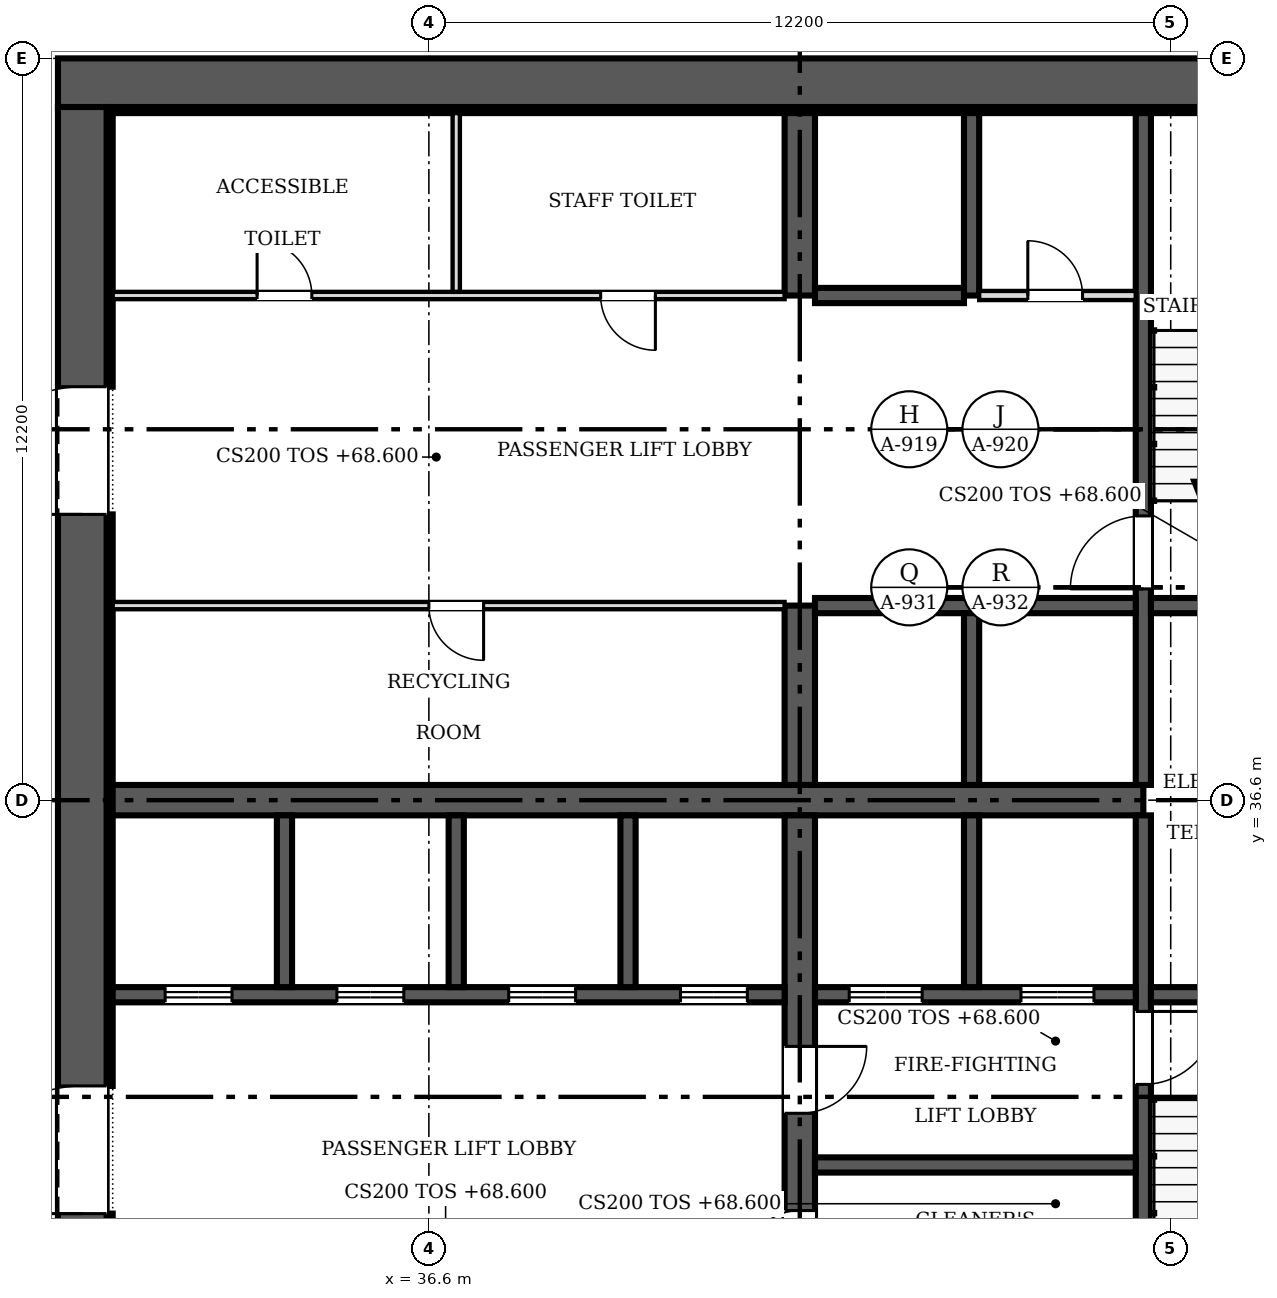
"""IFC4 building model, lengths in metres.
Left out: names, types, materials, properties, quantities, classifications, styles, units other than length and angle.
Written with IfcOpenShell. Run it as: python <this file> out.ifc"""

import sys

from ifc_helpers import new_model, si_unit, direction, frame, frame_2d, origin, place, context, subcontext, project, spatial, rectangle, extrude, source, transform, mapped, element, fill, save


model = new_model("IFC4")
c1 = context("Model", 3, precision=1e-05, world=origin(), true_north=direction((0.0, 1.0)))
c2 = subcontext(c1, "Body", "Model", "MODEL_VIEW")
j1 = project(units=[si_unit("LENGTHUNIT", "METRE"), si_unit("PLANEANGLEUNIT", "RADIAN")], contexts=[c1])
p1 = place(None, origin())
s1 = spatial("IfcSite", under=j1, at=p1, CompositionType="ELEMENT")
p2 = place(p1, origin())
s2 = spatial("IfcBuilding", under=s1, at=p2, CompositionType="ELEMENT")
p3 = place(p2, frame((0.0, 0.0, 68.6)))
s3 = spatial("IfcBuildingStorey", under=s2, at=p3, CompositionType="ELEMENT", Elevation=68.6)
p4 = place(p3, frame((30.9, 25.2, 0.0), z_axis=(0.0, 0.0, 1.0), x_axis=(0.0, 1.0, 0.0)))
e1 = element("IfcWall", 1, at=p4, inside=s3, PredefinedType="SHEAR", context=c2, shape_type="SweptSolid", body=[
    extrude(rectangle(XDim=22.8, YDim=0.8, at=frame_2d((11.4, 0.0))), origin(), (0.0, 0.0, 1.0), 3.8),
])
m1 = source(origin(), c2, "Body", "SweptSolid", [
    extrude(rectangle(XDim=2.1, YDim=2.4, at=frame_2d((1.05, 1.2))), frame((0.0, 0.41, 0.0), z_axis=(0.0, -1.0, 0.0), x_axis=(1.0, 0.0, 0.0)), (0.0, 0.0, 1.0), 0.82),
])
p5 = place(p4, frame((4.6, 0.0, 0.0)))
e2 = element("IfcOpeningElement", 2, at=p5, cuts=e1, PredefinedType="OPENING", context=c2, shape_type="MappedRepresentation", body=[
    mapped(m1, transform((0.0, 0.0, 0.0), scale=1.0)),
])
p6 = place(p4, frame((16.1, 0.0, 0.0)))
e3 = element("IfcOpeningElement", 3, at=p6, cuts=e1, PredefinedType="OPENING", context=c2, shape_type="MappedRepresentation", body=[
    mapped(m1, transform((0.0, 0.0, 0.0), scale=1.0)),
])
p7 = place(p3, frame((30.5, 48.4, 0.0), z_axis=(0.0, 0.0, 1.0), x_axis=(1.0, 0.0, 0.0)))
e4 = element("IfcWall", 4, at=p7, inside=s3, PredefinedType="SHEAR", context=c2, shape_type="SweptSolid", body=[
    extrude(rectangle(XDim=24.4, YDim=0.8, at=frame_2d((12.2, 0.0))), origin(), (0.0, 0.0, 1.0), 3.8),
])
p8 = place(p3, frame((31.3, 47.95, 0.0), z_axis=(0.0, 0.0, 1.0), x_axis=(1.0, 0.0, 0.0)))
e5 = element("IfcWall", 5, at=p8, inside=s3, PredefinedType="SOLIDWALL", context=c2, shape_type="SweptSolid", body=[
    extrude(rectangle(XDim=22.8, YDim=0.1, at=frame_2d((11.4, 0.0))), origin(), (0.0, 0.0, 1.0), 3.8),
])
p9 = place(p3, frame((31.35, 25.3, 0.0), z_axis=(0.0, 0.0, 1.0), x_axis=(0.0, 1.0, 0.0)))
e6 = element("IfcWall", 6, at=p9, inside=s3, PredefinedType="SOLIDWALL", context=c2, shape_type="SweptSolid", body=[
    extrude(rectangle(XDim=4.5, YDim=0.1, at=frame_2d((2.25, 0.0))), origin(), (0.0, 0.0, 1.0), 3.8),
])
p10 = place(p3, frame((31.35, 31.9, 0.0), z_axis=(0.0, 0.0, 1.0), x_axis=(0.0, 1.0, 0.0)))
e7 = element("IfcWall", 7, at=p10, inside=s3, PredefinedType="SOLIDWALL", context=c2, shape_type="SweptSolid", body=[
    extrude(rectangle(XDim=9.4, YDim=0.1, at=frame_2d((4.7, 0.0))), origin(), (0.0, 0.0, 1.0), 3.8),
])
p11 = place(p3, frame((31.35, 43.4, 0.0), z_axis=(0.0, 0.0, 1.0), x_axis=(0.0, 1.0, 0.0)))
e8 = element("IfcWall", 8, at=p11, inside=s3, PredefinedType="SOLIDWALL", context=c2, shape_type="SweptSolid", body=[
    extrude(rectangle(XDim=4.5, YDim=0.1, at=frame_2d((2.25, 0.0))), origin(), (0.0, 0.0, 1.0), 3.8),
])
p12 = place(p3, frame((31.4, 36.6, 0.0), z_axis=(0.0, 0.0, 1.0), x_axis=(1.0, 0.0, 0.0)))
e9 = element("IfcWall", 9, at=p12, inside=s3, PredefinedType="SHEAR", context=c2, shape_type="SweptSolid", body=[
    extrude(rectangle(XDim=16.95, YDim=0.5, at=frame_2d((8.475, 0.0))), origin(), (0.0, 0.0, 1.0), 3.8),
])
p13 = place(p3, frame((42.7, 36.35, 0.0), z_axis=(0.0, 0.0, 1.0), x_axis=(0.0, -1.0, 0.0)))
e10 = element("IfcWall", 10, at=p13, inside=s3, PredefinedType="SHEAR", context=c2, shape_type="SweptSolid", body=[
    extrude(rectangle(XDim=11.05, YDim=0.5, at=frame_2d((5.525, 0.0))), origin(), (0.0, 0.0, 1.0), 3.8),
])
m2 = source(origin(), c2, "Body", "SweptSolid", [
    extrude(rectangle(XDim=0.9, YDim=2.1, at=frame_2d((0.45, 1.05))), frame((0.0, 0.26, 0.0), z_axis=(0.0, -1.0, 0.0), x_axis=(1.0, 0.0, 0.0)), (0.0, 0.0, 1.0), 0.52),
])
p14 = place(p13, frame((6.5, 0.0, 0.0)))
e11 = element("IfcOpeningElement", 11, at=p14, cuts=e10, PredefinedType="OPENING", context=c2, shape_type="MappedRepresentation", body=[
    mapped(m2, transform((0.0, 0.0, 0.0), scale=1.0)),
])
m3 = source(origin(), c2, "Body", "SweptSolid", [
    extrude(rectangle(XDim=1.1, YDim=2.1, at=frame_2d((0.55, 1.05))), frame((0.0, 0.26, 0.0), z_axis=(0.0, -1.0, 0.0), x_axis=(1.0, 0.0, 0.0)), (0.0, 0.0, 1.0), 0.52),
])
p15 = place(p13, frame((3.8, 0.0, 0.0)))
e12 = element("IfcOpeningElement", 12, at=p15, cuts=e10, PredefinedType="OPENING", context=c2, shape_type="MappedRepresentation", body=[
    mapped(m3, transform((0.0, 0.0, 0.0), scale=1.0)),
])
p16 = place(p3, frame((42.7, 36.85, 0.0), z_axis=(0.0, 0.0, 1.0), x_axis=(0.0, 1.0, 0.0)))
e13 = element("IfcWall", 13, at=p16, inside=s3, PredefinedType="SHEAR", context=c2, shape_type="SweptSolid", body=[
    extrude(rectangle(XDim=2.95, YDim=0.5, at=frame_2d((1.475, 0.0))), origin(), (0.0, 0.0, 1.0), 3.8),
])
p17 = place(p3, frame((42.7, 44.9, 0.0), z_axis=(0.0, 0.0, 1.0), x_axis=(0.0, 1.0, 0.0)))
e14 = element("IfcWall", 14, at=p17, inside=s3, PredefinedType="SHEAR", context=c2, shape_type="SweptSolid", body=[
    extrude(rectangle(XDim=3.0, YDim=0.5, at=frame_2d((1.5, 0.0))), origin(), (0.0, 0.0, 1.0), 3.8),
])
p18 = place(p3, frame((48.35, 36.35, 0.0), z_axis=(0.0, 0.0, 1.0), x_axis=(0.0, -1.0, 0.0)))
e15 = element("IfcWall", 15, at=p18, inside=s3, PredefinedType="SOLIDWALL", context=c2, shape_type="SweptSolid", body=[
    extrude(rectangle(XDim=11.05, YDim=0.25, at=frame_2d((5.525, 0.0))), origin(), (0.0, 0.0, 1.0), 3.8),
])
m4 = source(origin(), c2, "Body", "SweptSolid", [
    extrude(rectangle(XDim=1.2, YDim=2.1, at=frame_2d((0.6, 1.05))), frame((0.0, 0.135, 0.0), z_axis=(0.0, -1.0, 0.0), x_axis=(1.0, 0.0, 0.0)), (0.0, 0.0, 1.0), 0.27),
])
p19 = place(p18, frame((3.225, 0.0, 0.0)))
e16 = element("IfcOpeningElement", 16, at=p19, cuts=e15, PredefinedType="OPENING", context=c2, shape_type="MappedRepresentation", body=[
    mapped(m4, transform((0.0, 0.0, 0.0), scale=1.0)),
])
p20 = place(p3, frame((48.35, 47.9, 0.0), z_axis=(0.0, 0.0, 1.0), x_axis=(0.0, -1.0, 0.0)))
e17 = element("IfcWall", 17, at=p20, inside=s3, PredefinedType="SOLIDWALL", context=c2, shape_type="SweptSolid", body=[
    extrude(rectangle(XDim=11.05, YDim=0.25, at=frame_2d((5.525, 0.0))), origin(), (0.0, 0.0, 1.0), 3.8),
])
p21 = place(p20, frame((6.625, 0.0, 0.0)))
e18 = element("IfcOpeningElement", 18, at=p21, cuts=e17, PredefinedType="OPENING", context=c2, shape_type="MappedRepresentation", body=[
    mapped(m4, transform((0.0, 0.0, 0.0), scale=1.0)),
])
p22 = place(p3, frame((42.45, 33.4, 0.0), z_axis=(0.0, 0.0, 1.0), x_axis=(-1.0, 0.0, 0.0)))
e19 = element("IfcWall", 19, at=p22, inside=s3, PredefinedType="SOLIDWALL", context=c2, shape_type="SweptSolid", body=[
    extrude(rectangle(XDim=11.05, YDim=0.25, at=frame_2d((5.525, 0.0))), origin(), (0.0, 0.0, 1.0), 3.8),
])
m5 = source(origin(), c2, "Body", "SweptSolid", [
    extrude(rectangle(XDim=1.1, YDim=2.1, at=frame_2d((0.55, 1.05))), frame((0.0, 0.135, 0.0), z_axis=(0.0, -1.0, 0.0), x_axis=(1.0, 0.0, 0.0)), (0.0, 0.0, 1.0), 0.27),
])
p23 = place(p22, frame((9.087, 0.0, 0.0)))
e20 = element("IfcOpeningElement", 20, at=p23, cuts=e19, PredefinedType="OPENING", context=c2, shape_type="MappedRepresentation", body=[
    mapped(m5, transform((0.0, 0.0, 0.0), scale=1.0)),
])
p24 = place(p22, frame((6.262, 0.0, 0.0)))
e21 = element("IfcOpeningElement", 21, at=p24, cuts=e19, PredefinedType="OPENING", context=c2, shape_type="MappedRepresentation", body=[
    mapped(m5, transform((0.0, 0.0, 0.0), scale=1.0)),
])
p25 = place(p22, frame((3.438, 0.0, 0.0)))
e22 = element("IfcOpeningElement", 22, at=p25, cuts=e19, PredefinedType="OPENING", context=c2, shape_type="MappedRepresentation", body=[
    mapped(m5, transform((0.0, 0.0, 0.0), scale=1.0)),
])
p26 = place(p22, frame((0.613, 0.0, 0.0)))
e23 = element("IfcOpeningElement", 23, at=p26, cuts=e19, PredefinedType="OPENING", context=c2, shape_type="MappedRepresentation", body=[
    mapped(m5, transform((0.0, 0.0, 0.0), scale=1.0)),
])
p27 = place(p3, frame((48.225, 33.4, 0.0), z_axis=(0.0, 0.0, 1.0), x_axis=(-1.0, 0.0, 0.0)))
e24 = element("IfcWall", 24, at=p27, inside=s3, PredefinedType="SOLIDWALL", context=c2, shape_type="SweptSolid", body=[
    extrude(rectangle(XDim=5.275, YDim=0.25, at=frame_2d((2.638, 0.0))), origin(), (0.0, 0.0, 1.0), 3.8),
])
p28 = place(p27, frame((3.512, 0.0, 0.0)))
e25 = element("IfcOpeningElement", 25, at=p28, cuts=e24, PredefinedType="OPENING", context=c2, shape_type="MappedRepresentation", body=[
    mapped(m4, transform((0.0, 0.0, 0.0), scale=1.0)),
])
p29 = place(p27, frame((0.688, 0.0, 0.0)))
e26 = element("IfcOpeningElement", 26, at=p29, cuts=e24, PredefinedType="OPENING", context=c2, shape_type="MappedRepresentation", body=[
    mapped(m4, transform((0.0, 0.0, 0.0), scale=1.0)),
])
p30 = place(p3, frame((48.475, 33.4, 0.0), z_axis=(0.0, 0.0, 1.0), x_axis=(1.0, 0.0, 0.0)))
e27 = element("IfcWall", 27, at=p30, inside=s3, PredefinedType="SOLIDWALL", context=c2, shape_type="SweptSolid", body=[
    extrude(rectangle(XDim=3.525, YDim=0.25, at=frame_2d((1.762, 0.0))), origin(), (0.0, 0.0, 1.0), 3.8),
])
p31 = place(p3, frame((42.95, 39.8, 0.0), z_axis=(0.0, 0.0, 1.0), x_axis=(1.0, 0.0, 0.0)))
e28 = element("IfcWall", 28, at=p31, inside=s3, PredefinedType="SOLIDWALL", context=c2, shape_type="SweptSolid", body=[
    extrude(rectangle(XDim=5.275, YDim=0.25, at=frame_2d((2.638, 0.0))), origin(), (0.0, 0.0, 1.0), 3.8),
])
p32 = place(p3, frame((48.475, 39.8, 0.0), z_axis=(0.0, 0.0, 1.0), x_axis=(1.0, 0.0, 0.0)))
e29 = element("IfcWall", 29, at=p32, inside=s3, PredefinedType="SOLIDWALL", context=c2, shape_type="SweptSolid", body=[
    extrude(rectangle(XDim=3.525, YDim=0.25, at=frame_2d((1.762, 0.0))), origin(), (0.0, 0.0, 1.0), 3.8),
])
p33 = place(p3, frame((45.525, 33.525, 0.0), z_axis=(0.0, 0.0, 1.0), x_axis=(0.0, 1.0, 0.0)))
e30 = element("IfcWall", 30, at=p33, inside=s3, PredefinedType="SOLIDWALL", context=c2, shape_type="SweptSolid", body=[
    extrude(rectangle(XDim=2.825, YDim=0.25, at=frame_2d((1.413, 0.0))), origin(), (0.0, 0.0, 1.0), 3.8),
])
p34 = place(p3, frame((45.525, 36.85, 0.0), z_axis=(0.0, 0.0, 1.0), x_axis=(0.0, 1.0, 0.0)))
e31 = element("IfcWall", 31, at=p34, inside=s3, PredefinedType="SOLIDWALL", context=c2, shape_type="SweptSolid", body=[
    extrude(rectangle(XDim=2.825, YDim=0.25, at=frame_2d((1.413, 0.0))), origin(), (0.0, 0.0, 1.0), 3.8),
])
p35 = place(p3, frame((42.95, 30.6, 0.0), z_axis=(0.0, 0.0, 1.0), x_axis=(1.0, 0.0, 0.0)))
e32 = element("IfcWall", 32, at=p35, inside=s3, PredefinedType="SOLIDWALL", context=c2, shape_type="SweptSolid", body=[
    extrude(rectangle(XDim=5.275, YDim=0.25, at=frame_2d((2.638, 0.0))), origin(), (0.0, 0.0, 1.0), 3.8),
])
for number, where, z_axis, x_axis in (
    (33, (34.225, 33.525, 0.0), (0.0, 0.0, 1.0), (0.0, 1.0, 0.0)),
    (34, (37.05, 33.525, 0.0), (0.0, 0.0, 1.0), (0.0, 1.0, 0.0)),
    (35, (39.875, 33.525, 0.0), (0.0, 0.0, 1.0), (0.0, 1.0, 0.0)),
):
    element("IfcWall", number, at=place(p3, frame(where, z_axis=z_axis, x_axis=x_axis)), inside=s3, PredefinedType="SOLIDWALL", context=c2, shape_type="SweptSolid", body=[
        extrude(rectangle(XDim=2.825, YDim=0.25, at=frame_2d((1.413, 0.0))), origin(), (0.0, 0.0, 1.0), 3.8),
    ])
p36 = place(p3, frame((45.525, 44.9, 0.0), z_axis=(0.0, 0.0, 1.0), x_axis=(0.0, 1.0, 0.0)))
e36 = element("IfcWall", 36, at=p36, inside=s3, PredefinedType="SOLIDWALL", context=c2, shape_type="SweptSolid", body=[
    extrude(rectangle(XDim=3.0, YDim=0.25, at=frame_2d((1.5, 0.0))), origin(), (0.0, 0.0, 1.0), 3.8),
])
p37 = place(p3, frame((42.95, 44.9, 0.0), z_axis=(0.0, 0.0, 1.0), x_axis=(1.0, 0.0, 0.0)))
e37 = element("IfcWall", 37, at=p37, inside=s3, PredefinedType="SOLIDWALL", context=c2, shape_type="SweptSolid", body=[
    extrude(rectangle(XDim=2.45, YDim=0.25, at=frame_2d((1.225, 0.0))), origin(), (0.0, 0.0, 1.0), 3.8),
])
p38 = place(p3, frame((42.45, 39.8, 0.0), z_axis=(0.0, 0.0, 1.0), x_axis=(-1.0, 0.0, 0.0)))
e38 = element("IfcWall", 38, at=p38, inside=s3, PredefinedType="PARTITIONING", context=c2, shape_type="SweptSolid", body=[
    extrude(rectangle(XDim=11.05, YDim=0.12, at=frame_2d((5.525, 0.0))), origin(), (0.0, 0.0, 1.0), 3.6),
])
m6 = source(origin(), c2, "Body", "SweptSolid", [
    extrude(rectangle(XDim=0.9, YDim=2.1, at=frame_2d((0.45, 1.05))), frame((0.0, 0.07, 0.0), z_axis=(0.0, -1.0, 0.0), x_axis=(1.0, 0.0, 0.0)), (0.0, 0.0, 1.0), 0.14),
])
p39 = place(p38, frame((4.95, 0.0, 0.0)))
e39 = element("IfcOpeningElement", 39, at=p39, cuts=e38, PredefinedType="OPENING", context=c2, shape_type="MappedRepresentation", body=[
    mapped(m6, transform((0.0, 0.0, 0.0), scale=1.0)),
])
p40 = place(p3, frame((31.4, 44.9, 0.0), z_axis=(0.0, 0.0, 1.0), x_axis=(1.0, 0.0, 0.0)))
e40 = element("IfcWall", 40, at=p40, inside=s3, PredefinedType="PARTITIONING", context=c2, shape_type="SweptSolid", body=[
    extrude(rectangle(XDim=11.05, YDim=0.12, at=frame_2d((5.525, 0.0))), origin(), (0.0, 0.0, 1.0), 3.6),
])
p41 = place(p40, frame((2.375, 0.0, 0.0)))
e41 = element("IfcOpeningElement", 41, at=p41, cuts=e40, PredefinedType="OPENING", context=c2, shape_type="MappedRepresentation", body=[
    mapped(m6, transform((0.0, 0.0, 0.0), scale=1.0)),
])
p42 = place(p40, frame((8.025, 0.0, 0.0)))
e42 = element("IfcOpeningElement", 42, at=p42, cuts=e40, PredefinedType="OPENING", context=c2, shape_type="MappedRepresentation", body=[
    mapped(m6, transform((0.0, 0.0, 0.0), scale=1.0)),
])
p43 = place(p3, frame((37.05, 44.96, 0.0), z_axis=(0.0, 0.0, 1.0), x_axis=(0.0, 1.0, 0.0)))
e43 = element("IfcWall", 43, at=p43, inside=s3, PredefinedType="PARTITIONING", context=c2, shape_type="SweptSolid", body=[
    extrude(rectangle(XDim=2.94, YDim=0.12, at=frame_2d((1.47, 0.0))), origin(), (0.0, 0.0, 1.0), 3.6),
])
p44 = place(p3, frame((45.65, 44.9, 0.0), z_axis=(0.0, 0.0, 1.0), x_axis=(1.0, 0.0, 0.0)))
e44 = element("IfcWall", 44, at=p44, inside=s3, PredefinedType="PARTITIONING", context=c2, shape_type="SweptSolid", body=[
    extrude(rectangle(XDim=2.575, YDim=0.15, at=frame_2d((1.288, 0.0))), origin(), (0.0, 0.0, 1.0), 3.6),
])
m7 = source(origin(), c2, "Body", "SweptSolid", [
    extrude(rectangle(XDim=0.9, YDim=2.1, at=frame_2d((0.45, 1.05))), frame((0.0, 0.085, 0.0), z_axis=(0.0, -1.0, 0.0), x_axis=(1.0, 0.0, 0.0)), (0.0, 0.0, 1.0), 0.17),
])
p45 = place(p44, frame((0.8, 0.0, 0.0)))
e45 = element("IfcOpeningElement", 45, at=p45, cuts=e44, PredefinedType="OPENING", context=c2, shape_type="MappedRepresentation", body=[
    mapped(m7, transform((0.0, 0.0, 0.0), scale=1.0)),
])
m8 = source(origin(), c2, "Body", "SweptSolid", [
    extrude(rectangle(XDim=2.1, YDim=2.4, at=frame_2d((1.05, 1.2))), frame((0.0, 0.025, 0.0), z_axis=(0.0, -1.0, 0.0), x_axis=(1.0, 0.0, 0.0)), (0.0, 0.0, 1.0), 0.05),
])
p46 = place(p5, origin())
e46 = element("IfcDoor", 46, at=p46, inside=s3, OperationType="DOUBLE_DOOR_SINGLE_SWING", PredefinedType="DOOR", context=c2, shape_type="MappedRepresentation", body=[
    mapped(m8, transform((0.0, 0.0, 0.0), scale=1.0)),
])
fill(e2, e46)
p47 = place(p6, origin())
e47 = element("IfcDoor", 47, at=p47, inside=s3, OperationType="DOUBLE_DOOR_SINGLE_SWING", PredefinedType="DOOR", context=c2, shape_type="MappedRepresentation", body=[
    mapped(m8, transform((0.0, 0.0, 0.0), scale=1.0)),
])
fill(e3, e47)
m9 = source(origin(), c2, "Body", "SweptSolid", [
    extrude(rectangle(XDim=0.9, YDim=2.1, at=frame_2d((0.45, 1.05))), frame((0.0, 0.025, 0.0), z_axis=(0.0, -1.0, 0.0), x_axis=(1.0, 0.0, 0.0)), (0.0, 0.0, 1.0), 0.05),
])
p48 = place(p14, origin())
e48 = element("IfcDoor", 48, at=p48, inside=s3, OperationType="SINGLE_SWING_RIGHT", PredefinedType="DOOR", context=c2, shape_type="MappedRepresentation", body=[
    mapped(m9, transform((0.0, 0.0, 0.0), scale=1.0)),
])
fill(e11, e48)
m10 = source(origin(), c2, "Body", "SweptSolid", [
    extrude(rectangle(XDim=1.1, YDim=2.1, at=frame_2d((0.55, 1.05))), frame((0.0, 0.025, 0.0), z_axis=(0.0, -1.0, 0.0), x_axis=(1.0, 0.0, 0.0)), (0.0, 0.0, 1.0), 0.05),
])
p49 = place(p15, origin())
e49 = element("IfcDoor", 49, at=p49, inside=s3, OperationType="SINGLE_SWING_LEFT", PredefinedType="DOOR", context=c2, shape_type="MappedRepresentation", body=[
    mapped(m10, transform((0.0, 0.0, 0.0), scale=1.0)),
])
fill(e12, e49)
m11 = source(origin(), c2, "Body", "SweptSolid", [
    extrude(rectangle(XDim=1.2, YDim=2.1, at=frame_2d((0.6, 1.05))), frame((0.0, 0.025, 0.0), z_axis=(0.0, -1.0, 0.0), x_axis=(1.0, 0.0, 0.0)), (0.0, 0.0, 1.0), 0.05),
])
p50 = place(p19, origin())
e50 = element("IfcDoor", 50, at=p50, inside=s3, OperationType="SINGLE_SWING_LEFT", PredefinedType="DOOR", context=c2, shape_type="MappedRepresentation", body=[
    mapped(m11, transform((0.0, 0.0, 0.0), scale=1.0)),
])
fill(e16, e50)
p51 = place(p21, origin())
e51 = element("IfcDoor", 51, at=p51, inside=s3, OperationType="SINGLE_SWING_RIGHT", PredefinedType="DOOR", context=c2, shape_type="MappedRepresentation", body=[
    mapped(m11, transform((0.0, 0.0, 0.0), scale=1.0)),
])
fill(e18, e51)
p52 = place(p23, origin())
e52 = element("IfcDoor", 52, at=p52, inside=s3, OperationType="DOUBLE_DOOR_SLIDING", PredefinedType="DOOR", context=c2, shape_type="MappedRepresentation", body=[
    mapped(m10, transform((0.0, 0.0, 0.0), scale=1.0)),
])
fill(e20, e52)
p53 = place(p24, origin())
e53 = element("IfcDoor", 53, at=p53, inside=s3, OperationType="DOUBLE_DOOR_SLIDING", PredefinedType="DOOR", context=c2, shape_type="MappedRepresentation", body=[
    mapped(m10, transform((0.0, 0.0, 0.0), scale=1.0)),
])
fill(e21, e53)
p54 = place(p25, origin())
e54 = element("IfcDoor", 54, at=p54, inside=s3, OperationType="DOUBLE_DOOR_SLIDING", PredefinedType="DOOR", context=c2, shape_type="MappedRepresentation", body=[
    mapped(m10, transform((0.0, 0.0, 0.0), scale=1.0)),
])
fill(e22, e54)
p55 = place(p26, origin())
e55 = element("IfcDoor", 55, at=p55, inside=s3, OperationType="DOUBLE_DOOR_SLIDING", PredefinedType="DOOR", context=c2, shape_type="MappedRepresentation", body=[
    mapped(m10, transform((0.0, 0.0, 0.0), scale=1.0)),
])
fill(e23, e55)
p56 = place(p28, origin())
e56 = element("IfcDoor", 56, at=p56, inside=s3, OperationType="DOUBLE_DOOR_SLIDING", PredefinedType="DOOR", context=c2, shape_type="MappedRepresentation", body=[
    mapped(m11, transform((0.0, 0.0, 0.0), scale=1.0)),
])
fill(e25, e56)
p57 = place(p29, origin())
e57 = element("IfcDoor", 57, at=p57, inside=s3, OperationType="DOUBLE_DOOR_SLIDING", PredefinedType="DOOR", context=c2, shape_type="MappedRepresentation", body=[
    mapped(m11, transform((0.0, 0.0, 0.0), scale=1.0)),
])
fill(e26, e57)
p58 = place(p39, origin())
e58 = element("IfcDoor", 58, at=p58, inside=s3, OperationType="SINGLE_SWING_LEFT", PredefinedType="DOOR", context=c2, shape_type="MappedRepresentation", body=[
    mapped(m9, transform((0.0, 0.0, 0.0), scale=1.0)),
])
fill(e39, e58)
p59 = place(p41, origin())
e59 = element("IfcDoor", 59, at=p59, inside=s3, OperationType="SINGLE_SWING_LEFT", PredefinedType="DOOR", context=c2, shape_type="MappedRepresentation", body=[
    mapped(m9, transform((0.0, 0.0, 0.0), scale=1.0)),
])
fill(e41, e59)
p60 = place(p42, origin())
e60 = element("IfcDoor", 60, at=p60, inside=s3, OperationType="SINGLE_SWING_RIGHT", PredefinedType="DOOR", context=c2, shape_type="MappedRepresentation", body=[
    mapped(m9, transform((0.0, 0.0, 0.0), scale=1.0)),
])
fill(e42, e60)
p61 = place(p45, origin())
e61 = element("IfcDoor", 61, at=p61, inside=s3, OperationType="SINGLE_SWING_LEFT", PredefinedType="DOOR", context=c2, shape_type="MappedRepresentation", body=[
    mapped(m9, transform((0.0, 0.0, 0.0), scale=1.0)),
])
fill(e45, e61)
save(model, sys.argv[1])
